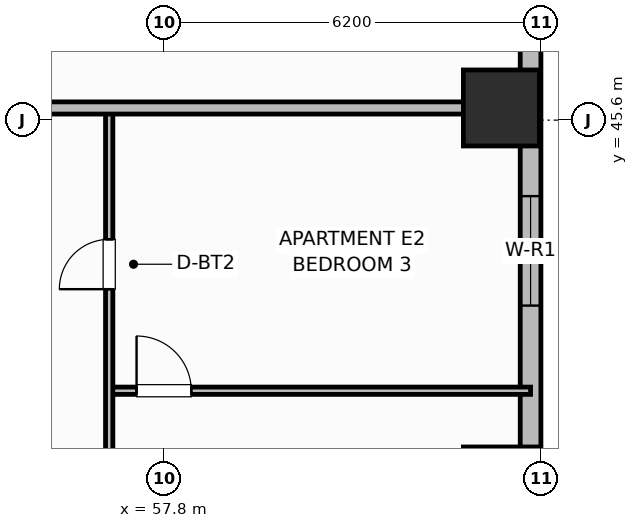
"""IFC4 building model, lengths in metres.
Left out: names, types, materials, properties, quantities, classifications, styles, units other than length and angle.
Written with IfcOpenShell. Run it as: python <this file> out.ifc"""

import sys

from ifc_helpers import new_model, si_unit, direction, frame, frame_2d, origin, origin_2d, place, context, subcontext, project, spatial, rectangle, extrude, element, fill, save


model = new_model("IFC4")
c1 = context("Model", 3, precision=1e-05, world=origin(), true_north=direction((0.0, 1.0)))
c2 = subcontext(c1, "Body", "Model", "MODEL_VIEW")
j1 = project(units=[si_unit("LENGTHUNIT", "METRE"), si_unit("PLANEANGLEUNIT", "RADIAN")], contexts=[c1])
p1 = place(None, origin())
s1 = spatial("IfcSite", under=j1, at=p1, CompositionType="ELEMENT")
p2 = place(p1, origin())
s2 = spatial("IfcBuilding", under=s1, at=p2, CompositionType="ELEMENT")
p3 = place(p2, frame((0.0, 0.0, 36.2)))
s3 = spatial("IfcBuildingStorey", under=s2, at=p3, CompositionType="ELEMENT", Elevation=36.2)
for number, where, z_axis, x_axis in (
    (1, (63.35, 39.6, 0.0), (0.0, 0.0, 1.0), (1.0, 0.0, 0.0)),
    (2, (63.35, 45.8, 0.0), (0.0, 0.0, 1.0), (1.0, 0.0, 0.0)),
):
    element("IfcColumn", number, at=place(p3, frame(where, z_axis=z_axis, x_axis=x_axis)), inside=s3, PredefinedType="COLUMN", context=c2, shape_type="SweptSolid", body=[
        extrude(rectangle(XDim=1.25, YDim=1.25, at=origin_2d()), origin(), (0.0, 0.0, 1.0), 3.7),
    ])
p4 = place(p3, frame((63.83, 32.6, 0.0), z_axis=(0.0, 0.0, 1.0), x_axis=(0.0, 1.0, 0.0)))
e3 = element("IfcWall", 3, at=p4, inside=s3, PredefinedType="SOLIDWALL", context=c2, shape_type="SweptSolid", body=[
    extrude(rectangle(XDim=14.8, YDim=0.34, at=frame_2d((7.4, 0.0))), origin(), (0.0, 0.0, 1.0), 2.7),
])
p5 = place(p4, frame((1.7, 0.0, 0.0)))
e4 = element("IfcOpeningElement", 4, at=p5, cuts=e3, PredefinedType="OPENING", context=c2, shape_type="SweptSolid", body=[
    extrude(rectangle(XDim=1.6, YDim=2.1, at=frame_2d((0.8, 1.05))), frame((0.0, 0.18, 0.0), z_axis=(0.0, -1.0, 0.0), x_axis=(1.0, 0.0, 0.0)), (0.0, 0.0, 1.0), 0.36),
])
p6 = place(p4, frame((4.92, 0.0, 0.69)))
e5 = element("IfcOpeningElement", 5, at=p6, cuts=e3, PredefinedType="OPENING", context=c2, shape_type="SweptSolid", body=[
    extrude(rectangle(XDim=1.4, YDim=1.85, at=frame_2d((0.7, 0.925))), frame((0.0, 0.18, 0.0), z_axis=(0.0, -1.0, 0.0), x_axis=(1.0, 0.0, 0.0)), (0.0, 0.0, 1.0), 0.36),
])
p7 = place(p4, frame((9.95, 0.0, 0.73)))
e6 = element("IfcOpeningElement", 6, at=p7, cuts=e3, PredefinedType="OPENING", context=c2, shape_type="SweptSolid", body=[
    extrude(rectangle(XDim=1.8, YDim=1.85, at=frame_2d((0.9, 0.925))), frame((0.0, 0.18, 0.0), z_axis=(0.0, -1.0, 0.0), x_axis=(1.0, 0.0, 0.0)), (0.0, 0.0, 1.0), 0.36),
])
p8 = place(p3, frame((56.9, 41.15, 0.0), z_axis=(0.0, 0.0, 1.0), x_axis=(1.0, 0.0, 0.0)))
e7 = element("IfcWall", 7, at=p8, inside=s3, PredefinedType="PARTITIONING", context=c2, shape_type="SweptSolid", body=[
    extrude(rectangle(XDim=6.93, YDim=0.12, at=frame_2d((3.465, 0.0))), origin(), (0.0, 0.0, 1.0), 2.53),
])
p9 = place(p8, frame((0.45, 0.0, 0.0)))
e8 = element("IfcOpeningElement", 8, at=p9, cuts=e7, PredefinedType="OPENING", context=c2, shape_type="SweptSolid", body=[
    extrude(rectangle(XDim=0.9, YDim=2.1, at=frame_2d((0.45, 1.05))), frame((0.0, 0.07, 0.0), z_axis=(0.0, -1.0, 0.0), x_axis=(1.0, 0.0, 0.0)), (0.0, 0.0, 1.0), 0.14),
])
p10 = place(p3, frame((56.9, 26.64, 0.0), z_axis=(0.0, 0.0, 1.0), x_axis=(0.0, 1.0, 0.0)))
e9 = element("IfcWall", 9, at=p10, inside=s3, PredefinedType="PARTITIONING", context=c2, shape_type="SweptSolid", body=[
    extrude(rectangle(XDim=19.12, YDim=0.12, at=frame_2d((9.56, 0.0))), origin(), (0.0, 0.0, 1.0), 2.53),
])
p11 = place(p10, frame((2.81, 0.0, 0.0)))
e10 = element("IfcOpeningElement", 10, at=p11, cuts=e9, PredefinedType="OPENING", context=c2, shape_type="SweptSolid", body=[
    extrude(rectangle(XDim=0.9, YDim=2.1, at=frame_2d((0.45, 1.05))), frame((0.0, 0.07, 0.0), z_axis=(0.0, -1.0, 0.0), x_axis=(1.0, 0.0, 0.0)), (0.0, 0.0, 1.0), 0.14),
])
p12 = place(p10, frame((16.18, 0.0, 0.0)))
e11 = element("IfcOpeningElement", 11, at=p12, cuts=e9, PredefinedType="OPENING", context=c2, shape_type="SweptSolid", body=[
    extrude(rectangle(XDim=0.82, YDim=2.08, at=frame_2d((0.41, 1.04))), frame((0.0, 0.07, 0.0), z_axis=(0.0, -1.0, 0.0), x_axis=(1.0, 0.0, 0.0)), (0.0, 0.0, 1.0), 0.14),
])
p13 = place(p3, frame((54.65, 45.8, 0.0), z_axis=(0.0, 0.0, 1.0), x_axis=(1.0, 0.0, 0.0)))
e12 = element("IfcWall", 12, at=p13, inside=s3, PredefinedType="PARTITIONING", context=c2, shape_type="SweptSolid", body=[
    extrude(rectangle(XDim=8.76, YDim=0.2, at=frame_2d((4.38, 0.0))), origin(), (0.0, 0.0, 1.0), 2.53),
])
p14 = place(p7, origin())
e13 = element("IfcWindow", 13, at=p14, inside=s3, PartitioningType="SINGLE_PANEL", PredefinedType="WINDOW", context=c2, shape_type="SweptSolid", body=[
    extrude(rectangle(XDim=1.8, YDim=1.85, at=frame_2d((0.9, 0.925))), frame((0.0, 0.03, 0.0), z_axis=(0.0, -1.0, 0.0), x_axis=(1.0, 0.0, 0.0)), (0.0, 0.0, 1.0), 0.06),
])
fill(e6, e13)
p15 = place(p9, origin())
e14 = element("IfcDoor", 14, at=p15, inside=s3, OperationType="SINGLE_SWING_LEFT", PredefinedType="DOOR", context=c2, shape_type="SweptSolid", body=[
    extrude(rectangle(XDim=0.9, YDim=2.1, at=frame_2d((0.45, 1.05))), frame((0.0, 0.025, 0.0), z_axis=(0.0, -1.0, 0.0), x_axis=(1.0, 0.0, 0.0)), (0.0, 0.0, 1.0), 0.05),
])
fill(e8, e14)
p16 = place(p12, origin())
e15 = element("IfcDoor", 15, at=p16, inside=s3, OperationType="SINGLE_SWING_LEFT", PredefinedType="DOOR", context=c2, shape_type="SweptSolid", body=[
    extrude(rectangle(XDim=0.82, YDim=2.08, at=frame_2d((0.41, 1.04))), frame((0.0, 0.025, 0.0), z_axis=(0.0, -1.0, 0.0), x_axis=(1.0, 0.0, 0.0)), (0.0, 0.0, 1.0), 0.05),
])
fill(e11, e15)
save(model, sys.argv[1])
